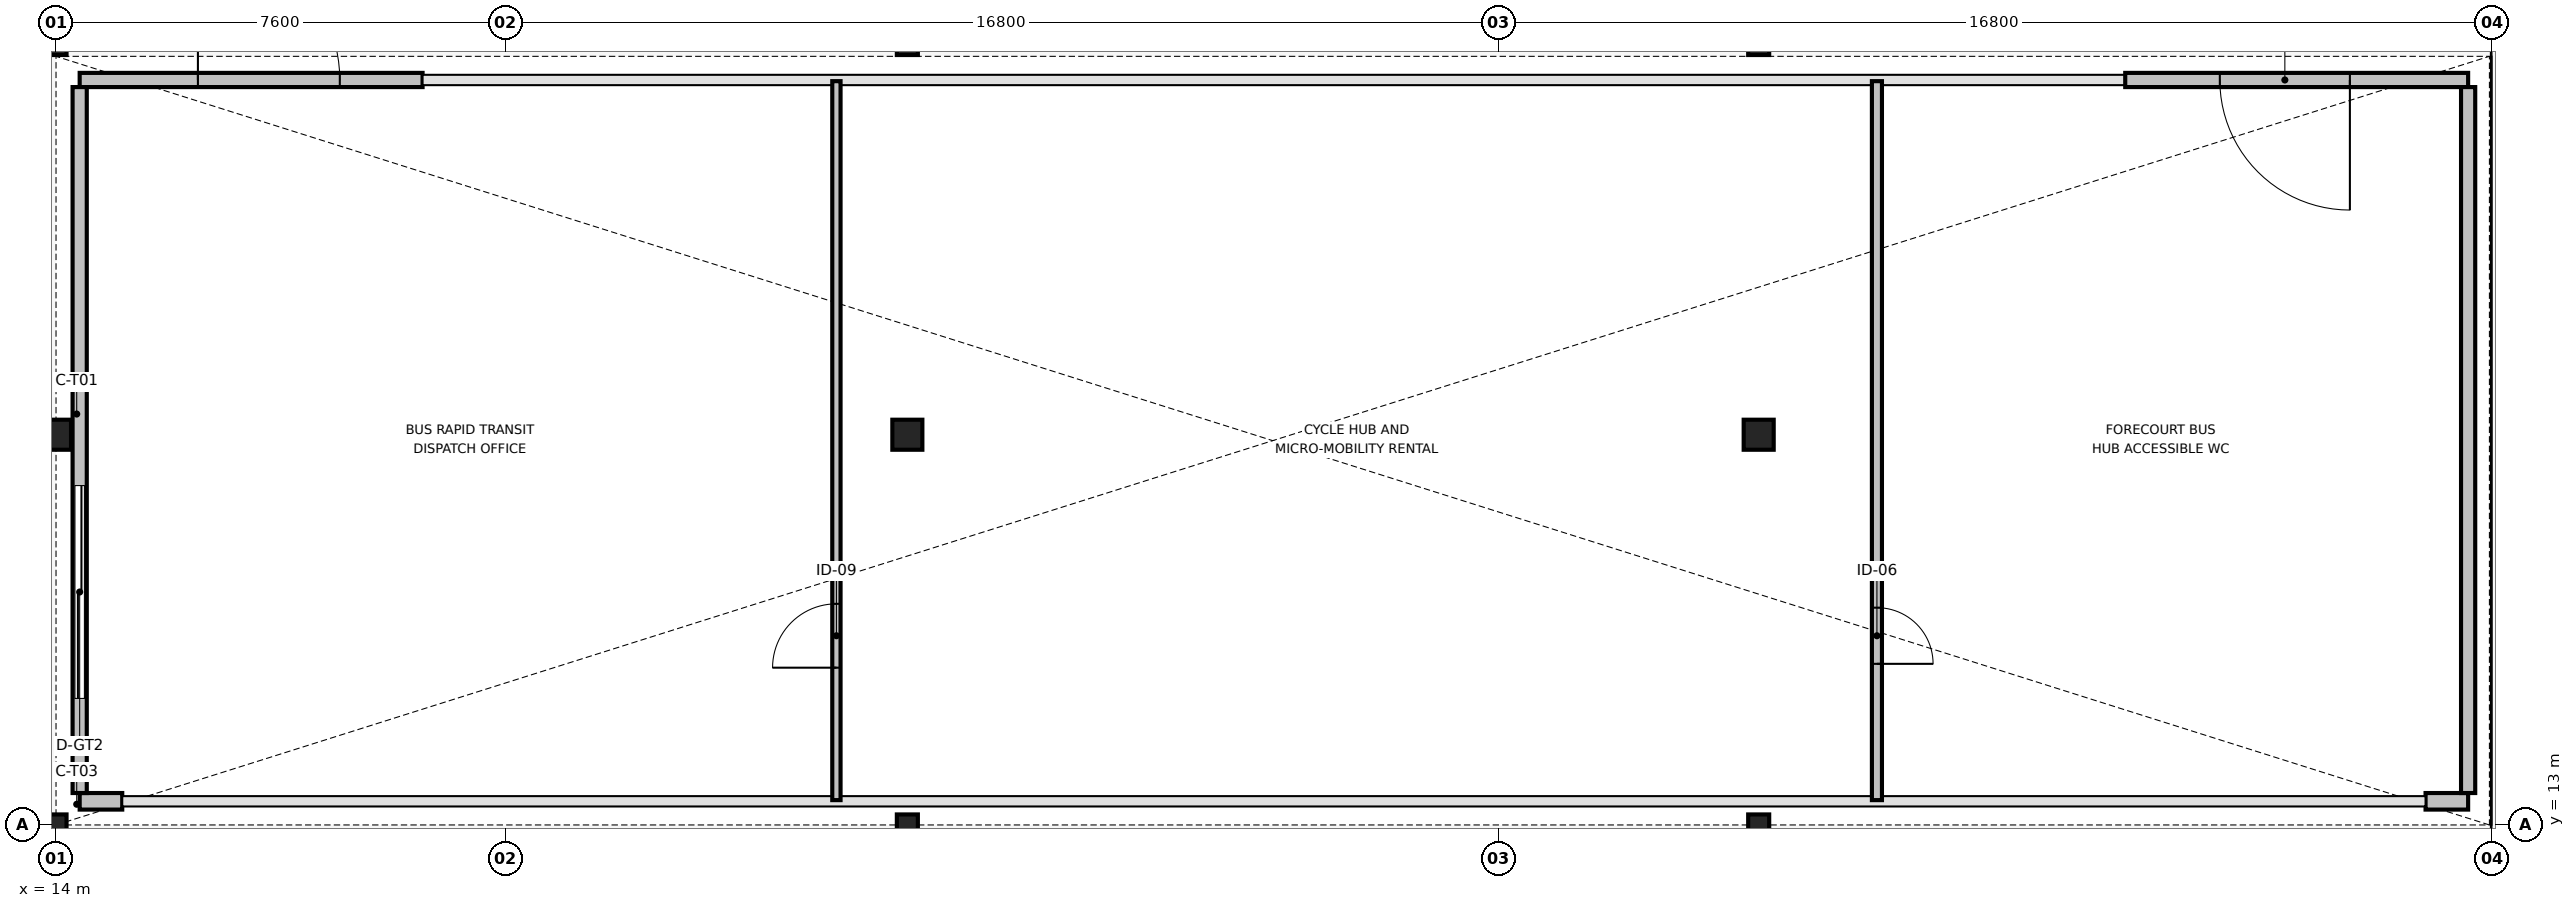
"""IFC4 building model, lengths in metres.
Left out: names, types, materials, properties, quantities, classifications, styles, units other than length and angle.
Written with IfcOpenShell. Run it as: python <this file> out.ifc"""

import sys

from ifc_helpers import new_model, si_unit, direction, frame, frame_2d, origin, origin_2d, place, context, subcontext, project, spatial, rectangle, hollow_circle, extrude, element, fill, save


model = new_model("IFC4")
c1 = context("Model", 3, precision=1e-05, world=origin(), true_north=direction((0.0, 1.0)))
c2 = subcontext(c1, "Body", "Model", "MODEL_VIEW")
j1 = project(units=[si_unit("LENGTHUNIT", "METRE"), si_unit("PLANEANGLEUNIT", "RADIAN")], contexts=[c1])
p1 = place(None, origin())
s1 = spatial("IfcSite", under=j1, at=p1, CompositionType="ELEMENT")
p2 = place(p1, origin())
s2 = spatial("IfcBuilding", under=s1, at=p2, CompositionType="ELEMENT")
p3 = place(p2, origin())
s3 = spatial("IfcBuildingStorey", under=s2, at=p3, CompositionType="ELEMENT", Elevation=0.0)
p4 = place(p3, frame((14.0, 13.0, -0.95), z_axis=(0.0, 0.0, 1.0), x_axis=(1.0, 0.0, 0.0)))
e1 = element("IfcColumn", 1, at=p4, inside=s3, PredefinedType="PILASTER", context=c2, shape_type="SweptSolid", body=[
    extrude(hollow_circle(Radius=0.178, WallThickness=0.012, at=origin_2d()), origin(), (0.0, 0.0, 1.0), 11.65),
])
p5 = place(p3, frame((14.0, 19.6, -0.95), z_axis=(0.0, 0.0, 1.0), x_axis=(1.0, 0.0, 0.0)))
e2 = element("IfcColumn", 2, at=p5, inside=s3, PredefinedType="COLUMN", context=c2, shape_type="SweptSolid", body=[
    extrude(hollow_circle(Radius=0.254, WallThickness=0.016, at=origin_2d()), origin(), (0.0, 0.0, 1.0), 10.4),
])
for number, where, z_axis, x_axis in (
    (3, (14.0, 26.2, -0.95), (0.0, 0.0, 1.0), (1.0, 0.0, 0.0)),
    (4, (28.4, 13.0, -0.95), (0.0, 0.0, 1.0), (1.0, 0.0, 0.0)),
):
    element("IfcColumn", number, at=place(p3, frame(where, z_axis=z_axis, x_axis=x_axis)), inside=s3, PredefinedType="PILASTER", context=c2, shape_type="SweptSolid", body=[
        extrude(hollow_circle(Radius=0.178, WallThickness=0.012, at=origin_2d()), origin(), (0.0, 0.0, 1.0), 11.65),
    ])
p6 = place(p3, frame((28.4, 19.6, -0.95), z_axis=(0.0, 0.0, 1.0), x_axis=(1.0, 0.0, 0.0)))
e5 = element("IfcColumn", 5, at=p6, inside=s3, PredefinedType="COLUMN", context=c2, shape_type="SweptSolid", body=[
    extrude(hollow_circle(Radius=0.254, WallThickness=0.016, at=origin_2d()), origin(), (0.0, 0.0, 1.0), 10.4),
])
for number, where, z_axis, x_axis in (
    (6, (28.4, 26.2, -0.95), (0.0, 0.0, 1.0), (1.0, 0.0, 0.0)),
    (7, (42.8, 13.0, -0.95), (0.0, 0.0, 1.0), (1.0, 0.0, 0.0)),
):
    element("IfcColumn", number, at=place(p3, frame(where, z_axis=z_axis, x_axis=x_axis)), inside=s3, PredefinedType="PILASTER", context=c2, shape_type="SweptSolid", body=[
        extrude(hollow_circle(Radius=0.178, WallThickness=0.012, at=origin_2d()), origin(), (0.0, 0.0, 1.0), 11.65),
    ])
p7 = place(p3, frame((42.8, 19.6, -0.95), z_axis=(0.0, 0.0, 1.0), x_axis=(1.0, 0.0, 0.0)))
e8 = element("IfcColumn", 8, at=p7, inside=s3, PredefinedType="COLUMN", context=c2, shape_type="SweptSolid", body=[
    extrude(hollow_circle(Radius=0.254, WallThickness=0.016, at=origin_2d()), origin(), (0.0, 0.0, 1.0), 10.4),
])
p8 = place(p3, frame((42.8, 26.2, -0.95), z_axis=(0.0, 0.0, 1.0), x_axis=(1.0, 0.0, 0.0)))
e9 = element("IfcColumn", 9, at=p8, inside=s3, PredefinedType="PILASTER", context=c2, shape_type="SweptSolid", body=[
    extrude(hollow_circle(Radius=0.178, WallThickness=0.012, at=origin_2d()), origin(), (0.0, 0.0, 1.0), 11.65),
])
p9 = place(p3, frame((14.4, 25.6, 0.0), z_axis=(0.0, 0.0, 1.0), x_axis=(1.0, 0.0, 0.0)))
e10 = element("IfcWall", 10, at=p9, inside=s3, PredefinedType="STANDARD", context=c2, shape_type="SweptSolid", body=[
    extrude(rectangle(XDim=5.8, YDim=0.24, at=frame_2d((2.9, 0.0))), origin(), (0.0, 0.0, 1.0), 4.2),
])
p10 = place(p9, frame((2.0, 0.0, 0.0)))
e11 = element("IfcOpeningElement", 11, at=p10, cuts=e10, PredefinedType="OPENING", context=c2, shape_type="SweptSolid", body=[
    extrude(rectangle(XDim=2.4, YDim=2.4, at=frame_2d((1.2, 1.2))), frame((0.0, 0.13, 0.0), z_axis=(0.0, -1.0, 0.0), x_axis=(1.0, 0.0, 0.0)), (0.0, 0.0, 1.0), 0.26),
])
p11 = place(p3, frame((49.0, 25.6, 0.0), z_axis=(0.0, 0.0, 1.0), x_axis=(1.0, 0.0, 0.0)))
e12 = element("IfcWall", 12, at=p11, inside=s3, PredefinedType="STANDARD", context=c2, shape_type="SweptSolid", body=[
    extrude(rectangle(XDim=5.8, YDim=0.24, at=frame_2d((2.9, 0.0))), origin(), (0.0, 0.0, 1.0), 4.2),
])
p12 = place(p11, frame((1.6, 0.0, 0.0)))
e13 = element("IfcOpeningElement", 13, at=p12, cuts=e12, PredefinedType="OPENING", context=c2, shape_type="SweptSolid", body=[
    extrude(rectangle(XDim=2.2, YDim=2.4, at=frame_2d((1.1, 1.2))), frame((0.0, 0.13, 0.0), z_axis=(0.0, -1.0, 0.0), x_axis=(1.0, 0.0, 0.0)), (0.0, 0.0, 1.0), 0.26),
])
p13 = place(p3, frame((14.4, 13.4, 0.0), z_axis=(0.0, 0.0, 1.0), x_axis=(1.0, 0.0, 0.0)))
e14 = element("IfcWall", 14, at=p13, inside=s3, PredefinedType="STANDARD", context=c2, shape_type="SweptSolid", body=[
    extrude(rectangle(XDim=0.72, YDim=0.28, at=frame_2d((0.36, 0.0))), origin(), (0.0, 0.0, 1.0), 4.2),
])
p14 = place(p3, frame((54.08, 13.4, 0.0), z_axis=(0.0, 0.0, 1.0), x_axis=(1.0, 0.0, 0.0)))
e15 = element("IfcWall", 15, at=p14, inside=s3, PredefinedType="STANDARD", context=c2, shape_type="SweptSolid", body=[
    extrude(rectangle(XDim=0.72, YDim=0.28, at=frame_2d((0.36, 0.0))), origin(), (0.0, 0.0, 1.0), 4.2),
])
p15 = place(p3, frame((14.4, 13.54, 0.0), z_axis=(0.0, 0.0, 1.0), x_axis=(0.0, 1.0, 0.0)))
e16 = element("IfcWall", 16, at=p15, inside=s3, PredefinedType="STANDARD", context=c2, shape_type="SweptSolid", body=[
    extrude(rectangle(XDim=11.94, YDim=0.24, at=frame_2d((5.97, 0.0))), origin(), (0.0, 0.0, 1.0), 4.2),
])
p16 = place(p15, frame((1.6, 0.0, 0.0)))
e17 = element("IfcOpeningElement", 17, at=p16, cuts=e16, PredefinedType="OPENING", context=c2, shape_type="SweptSolid", body=[
    extrude(rectangle(XDim=3.6, YDim=3.4, at=frame_2d((1.8, 1.7))), frame((0.0, 0.13, 0.0), z_axis=(0.0, -1.0, 0.0), x_axis=(1.0, 0.0, 0.0)), (0.0, 0.0, 1.0), 0.26),
])
p17 = place(p3, frame((54.8, 13.54, 0.0), z_axis=(0.0, 0.0, 1.0), x_axis=(0.0, 1.0, 0.0)))
e18 = element("IfcWall", 18, at=p17, inside=s3, PredefinedType="STANDARD", context=c2, shape_type="SweptSolid", body=[
    extrude(rectangle(XDim=11.94, YDim=0.24, at=frame_2d((5.97, 0.0))), origin(), (0.0, 0.0, 1.0), 4.2),
])
p18 = place(p3, frame((27.2, 13.42, 0.0), z_axis=(0.0, 0.0, 1.0), x_axis=(0.0, 1.0, 0.0)))
e19 = element("IfcWall", 19, at=p18, inside=s3, PredefinedType="PARTITIONING", context=c2, shape_type="SweptSolid", body=[
    extrude(rectangle(XDim=12.16, YDim=0.14, at=frame_2d((6.08, 0.0))), origin(), (0.0, 0.0, 1.0), 5.16),
])
p19 = place(p18, frame((2.24, 0.0, 0.0)))
e20 = element("IfcOpeningElement", 20, at=p19, cuts=e19, PredefinedType="OPENING", context=c2, shape_type="SweptSolid", body=[
    extrude(rectangle(XDim=1.08, YDim=2.1, at=frame_2d((0.54, 1.05))), frame((0.0, 0.08, 0.0), z_axis=(0.0, -1.0, 0.0), x_axis=(1.0, 0.0, 0.0)), (0.0, 0.0, 1.0), 0.16),
])
p20 = place(p3, frame((44.8, 25.58, 0.0), z_axis=(0.0, 0.0, 1.0), x_axis=(0.0, -1.0, 0.0)))
e21 = element("IfcWall", 21, at=p20, inside=s3, PredefinedType="PLUMBINGWALL", context=c2, shape_type="SweptSolid", body=[
    extrude(rectangle(XDim=12.16, YDim=0.17, at=frame_2d((6.08, 0.0))), origin(), (0.0, 0.0, 1.0), 5.16),
])
p21 = place(p20, frame((9.855, 0.0, 0.0), z_axis=(0.0, 0.0, 1.0), x_axis=(-1.0, 0.0, 0.0)))
e22 = element("IfcOpeningElement", 22, at=p21, cuts=e21, PredefinedType="OPENING", context=c2, shape_type="SweptSolid", body=[
    extrude(rectangle(XDim=0.95, YDim=2.15, at=frame_2d((0.475, 1.075))), frame((0.0, 0.095, 0.0), z_axis=(0.0, -1.0, 0.0), x_axis=(1.0, 0.0, 0.0)), (0.0, 0.0, 1.0), 0.19),
])
p22 = place(p10, origin())
e23 = element("IfcDoor", 23, at=p22, inside=s3, OperationType="SINGLE_SWING_LEFT", PredefinedType="DOOR", context=c2, shape_type="SweptSolid", body=[
    extrude(rectangle(XDim=2.4, YDim=2.4, at=frame_2d((1.2, 1.2))), frame((0.0, 0.025, 0.0), z_axis=(0.0, -1.0, 0.0), x_axis=(1.0, 0.0, 0.0)), (0.0, 0.0, 1.0), 0.05),
])
fill(e11, e23)
p23 = place(p12, origin())
e24 = element("IfcDoor", 24, at=p23, inside=s3, OperationType="SINGLE_SWING_RIGHT", PredefinedType="DOOR", context=c2, shape_type="SweptSolid", body=[
    extrude(rectangle(XDim=2.2, YDim=2.4, at=frame_2d((1.1, 1.2))), frame((0.0, 0.025, 0.0), z_axis=(0.0, -1.0, 0.0), x_axis=(1.0, 0.0, 0.0)), (0.0, 0.0, 1.0), 0.05),
])
fill(e13, e24)
p24 = place(p16, origin())
e25 = element("IfcDoor", 25, at=p24, inside=s3, OperationType="ROLLINGUP", PredefinedType="GATE", context=c2, shape_type="SweptSolid", body=[
    extrude(rectangle(XDim=3.6, YDim=3.4, at=frame_2d((1.8, 1.7))), frame((0.0, 0.025, 0.0), z_axis=(0.0, -1.0, 0.0), x_axis=(1.0, 0.0, 0.0)), (0.0, 0.0, 1.0), 0.05),
])
fill(e17, e25)
p25 = place(p19, origin())
e26 = element("IfcDoor", 26, at=p25, inside=s3, OperationType="SINGLE_SWING_LEFT", PredefinedType="DOOR", context=c2, shape_type="SweptSolid", body=[
    extrude(rectangle(XDim=1.08, YDim=2.1, at=frame_2d((0.54, 1.05))), frame((0.0, 0.025, 0.0), z_axis=(0.0, -1.0, 0.0), x_axis=(1.0, 0.0, 0.0)), (0.0, 0.0, 1.0), 0.05),
])
fill(e20, e26)
p26 = place(p21, origin())
e27 = element("IfcDoor", 27, at=p26, inside=s3, OperationType="SINGLE_SWING_RIGHT", PredefinedType="DOOR", context=c2, shape_type="SweptSolid", body=[
    extrude(rectangle(XDim=0.95, YDim=2.15, at=frame_2d((0.475, 1.075))), frame((0.0, 0.025, 0.0), z_axis=(0.0, -1.0, 0.0), x_axis=(1.0, 0.0, 0.0)), (0.0, 0.0, 1.0), 0.05),
])
fill(e22, e27)
save(model, sys.argv[1])
